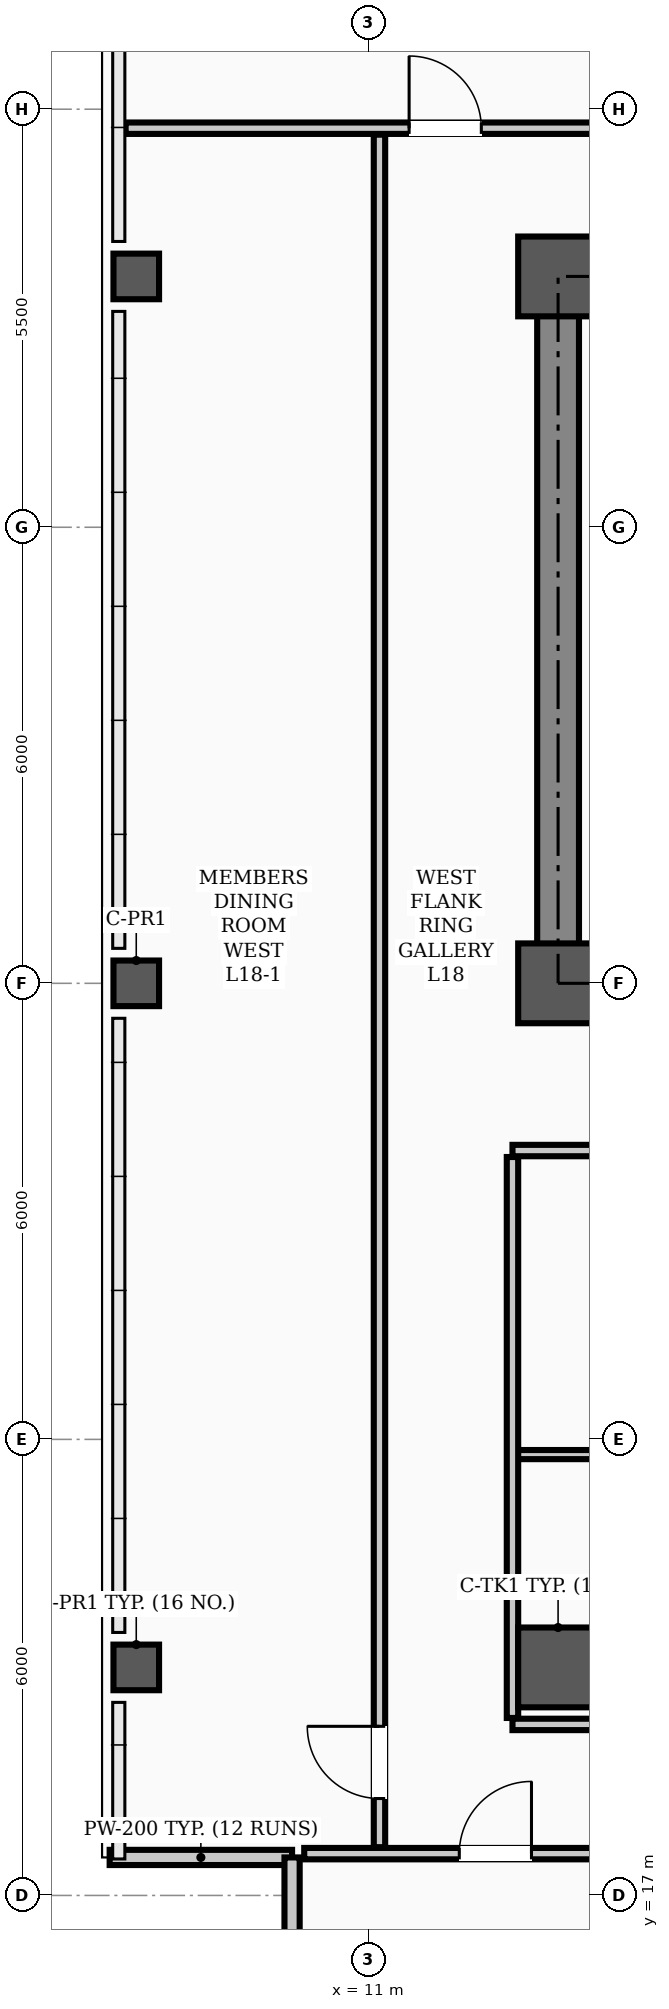
"""IFC4 building model, lengths in metres.
Left out: names, types, materials, properties, quantities, classifications, styles, units other than length and angle.
Written with IfcOpenShell. Run it as: python <this file> out.ifc"""

import sys

from ifc_helpers import new_model, si_unit, direction, frame, frame_2d, origin, origin_2d, place, context, subcontext, project, spatial, rectangle, hollow_rectangle, extrude, element, fill, save


model = new_model("IFC4")
c1 = context("Model", 3, precision=1e-05, world=origin(), true_north=direction((0.0, 1.0)))
c2 = subcontext(c1, "Body", "Model", "MODEL_VIEW")
j1 = project(units=[si_unit("LENGTHUNIT", "METRE"), si_unit("PLANEANGLEUNIT", "RADIAN")], contexts=[c1])
p1 = place(None, origin())
s1 = spatial("IfcSite", under=j1, at=p1, CompositionType="ELEMENT")
p2 = place(p1, origin())
s2 = spatial("IfcBuilding", under=s1, at=p2, CompositionType="ELEMENT")
p3 = place(p2, frame((0.0, 0.0, 73.3)))
s3 = spatial("IfcBuildingStorey", under=s2, at=p3, CompositionType="ELEMENT", Elevation=73.3)
for number, where, z_axis, x_axis in (
    (1, (13.5, 29.0, 0.0), (0.0, 0.0, 1.0), (1.0, 0.0, 0.0)),
    (2, (13.5, 38.3, 0.0), (0.0, 0.0, 1.0), (1.0, 0.0, 0.0)),
    (3, (13.5, 20.0, 0.0), (0.0, 0.0, 1.0), (1.0, 0.0, 0.0)),
):
    element("IfcColumn", number, at=place(p3, frame(where, z_axis=z_axis, x_axis=x_axis)), inside=s3, PredefinedType="COLUMN", context=c2, shape_type="SweptSolid", body=[
        extrude(hollow_rectangle(XDim=1.05, YDim=1.05, WallThickness=0.038, InnerFilletRadius=0.019, OuterFilletRadius=0.057, at=origin_2d()), origin(), (0.0, 0.0, 1.0), 3.9),
    ])
for number, where, z_axis, x_axis in (
    (4, (7.95, 20.0, 0.0), (0.0, 0.0, 1.0), (1.0, 0.0, 0.0)),
    (5, (7.95, 29.0, 0.0), (0.0, 0.0, 1.0), (1.0, 0.0, 0.0)),
    (6, (7.95, 38.3, 0.0), (0.0, 0.0, 1.0), (1.0, 0.0, 0.0)),
):
    element("IfcColumn", number, at=place(p3, frame(where, z_axis=z_axis, x_axis=x_axis)), inside=s3, PredefinedType="COLUMN", context=c2, shape_type="SweptSolid", body=[
        extrude(hollow_rectangle(XDim=0.6, YDim=0.6, WallThickness=0.026, InnerFilletRadius=0.013, OuterFilletRadius=0.039, at=origin_2d()), origin(), (0.0, 0.0, 1.0), 3.9),
    ])
for number, where, z_axis, x_axis in (
    (7, (7.6, 17.5, 0.0), (0.0, 0.0, 1.0), (1.0, 0.0, 0.0)),
    (8, (10.0, 17.5, 0.0), (0.0, 0.0, 1.0), (0.0, -1.0, 0.0)),
):
    element("IfcWall", number, at=place(p3, frame(where, z_axis=z_axis, x_axis=x_axis)), inside=s3, PredefinedType="PARAPET", context=c2, shape_type="SweptSolid", body=[
        extrude(rectangle(XDim=2.4, YDim=0.2, at=frame_2d((1.2, 0.0))), origin(), (0.0, 0.0, 1.0), 1.2),
    ])
p4 = place(p3, frame((13.5, 29.0, 0.0), z_axis=(0.0, 0.0, 1.0), x_axis=(1.0, 0.0, 0.0)))
e9 = element("IfcWall", 9, at=p4, inside=s3, PredefinedType="SHEAR", context=c2, shape_type="SweptSolid", body=[
    extrude(rectangle(XDim=30.5, YDim=0.55, at=frame_2d((15.25, 0.0))), origin(), (0.0, 0.0, 1.0), 3.72),
])
p5 = place(p4, frame((1.75, 0.0, 0.0)))
e10 = element("IfcOpeningElement", 10, at=p5, cuts=e9, PredefinedType="OPENING", context=c2, shape_type="SweptSolid", body=[
    extrude(rectangle(XDim=1.1, YDim=2.08, at=frame_2d((0.55, 1.04))), frame((0.0, 0.285, 0.0), z_axis=(0.0, -1.0, 0.0), x_axis=(1.0, 0.0, 0.0)), (0.0, 0.0, 1.0), 0.57),
])
p6 = place(p4, frame((26.7, 0.0, 0.0)))
e11 = element("IfcOpeningElement", 11, at=p6, cuts=e9, PredefinedType="OPENING", context=c2, shape_type="SweptSolid", body=[
    extrude(rectangle(XDim=1.1, YDim=2.08, at=frame_2d((0.55, 1.04))), frame((0.0, 0.285, 0.0), z_axis=(0.0, -1.0, 0.0), x_axis=(1.0, 0.0, 0.0)), (0.0, 0.0, 1.0), 0.57),
])
p7 = place(p4, frame((6.8, 0.0, 0.0)))
e12 = element("IfcOpeningElement", 12, at=p7, cuts=e9, PredefinedType="OPENING", context=c2, shape_type="SweptSolid", body=[
    extrude(rectangle(XDim=1.1, YDim=2.08, at=frame_2d((0.55, 1.04))), frame((0.0, 0.285, 0.0), z_axis=(0.0, -1.0, 0.0), x_axis=(1.0, 0.0, 0.0)), (0.0, 0.0, 1.0), 0.57),
])
p8 = place(p4, frame((13.2, 0.0, 0.0)))
e13 = element("IfcOpeningElement", 13, at=p8, cuts=e9, PredefinedType="OPENING", context=c2, shape_type="SweptSolid", body=[
    extrude(rectangle(XDim=1.6, YDim=2.08, at=frame_2d((0.8, 1.04))), frame((0.0, 0.285, 0.0), z_axis=(0.0, -1.0, 0.0), x_axis=(1.0, 0.0, 0.0)), (0.0, 0.0, 1.0), 0.57),
])
p9 = place(p4, frame((20.525, 0.0, 0.0)))
e14 = element("IfcOpeningElement", 14, at=p9, cuts=e9, PredefinedType="OPENING", context=c2, shape_type="SweptSolid", body=[
    extrude(rectangle(XDim=0.95, YDim=2.08, at=frame_2d((0.475, 1.04))), frame((0.0, 0.285, 0.0), z_axis=(0.0, -1.0, 0.0), x_axis=(1.0, 0.0, 0.0)), (0.0, 0.0, 1.0), 0.57),
])
p10 = place(p3, frame((13.5, 38.3, 0.0), z_axis=(0.0, 0.0, 1.0), x_axis=(1.0, 0.0, 0.0)))
e15 = element("IfcWall", 15, at=p10, inside=s3, PredefinedType="SHEAR", context=c2, shape_type="SweptSolid", body=[
    extrude(rectangle(XDim=30.5, YDim=0.55, at=frame_2d((15.25, 0.0))), origin(), (0.0, 0.0, 1.0), 3.72),
])
p11 = place(p3, frame((13.5, 29.35, 0.0), z_axis=(0.0, 0.0, 1.0), x_axis=(0.0, 1.0, 0.0)))
e16 = element("IfcWall", 16, at=p11, inside=s3, PredefinedType="SHEAR", context=c2, shape_type="SweptSolid", body=[
    extrude(rectangle(XDim=8.6, YDim=0.55, at=frame_2d((4.3, 0.0))), origin(), (0.0, 0.0, 1.0), 3.72),
])
p12 = place(p3, frame((12.9, 26.8, 0.0), z_axis=(0.0, 0.0, 1.0), x_axis=(1.0, 0.0, 0.0)))
e17 = element("IfcWall", 17, at=p12, inside=s3, PredefinedType="PARTITIONING", context=c2, shape_type="SweptSolid", body=[
    extrude(rectangle(XDim=31.7, YDim=0.15, at=frame_2d((15.85, 0.0))), origin(), (0.0, 0.0, 1.0), 3.1),
])
p13 = place(p12, frame((13.6, 0.0, 0.0)))
e18 = element("IfcOpeningElement", 18, at=p13, cuts=e17, PredefinedType="OPENING", context=c2, shape_type="SweptSolid", body=[
    extrude(rectangle(XDim=1.6, YDim=2.08, at=frame_2d((0.8, 1.04))), frame((0.0, 0.085, 0.0), z_axis=(0.0, -1.0, 0.0), x_axis=(1.0, 0.0, 0.0)), (0.0, 0.0, 1.0), 0.17),
])
p14 = place(p12, frame((2.475, 0.0, 0.0)))
e19 = element("IfcOpeningElement", 19, at=p14, cuts=e17, PredefinedType="OPENING", context=c2, shape_type="SweptSolid", body=[
    extrude(rectangle(XDim=0.95, YDim=2.08, at=frame_2d((0.475, 1.04))), frame((0.0, 0.085, 0.0), z_axis=(0.0, -1.0, 0.0), x_axis=(1.0, 0.0, 0.0)), (0.0, 0.0, 1.0), 0.17),
])
p15 = place(p12, frame((9.125, 0.0, 0.0)))
e20 = element("IfcOpeningElement", 20, at=p15, cuts=e17, PredefinedType="OPENING", context=c2, shape_type="SweptSolid", body=[
    extrude(rectangle(XDim=0.95, YDim=2.08, at=frame_2d((0.475, 1.04))), frame((0.0, 0.085, 0.0), z_axis=(0.0, -1.0, 0.0), x_axis=(1.0, 0.0, 0.0)), (0.0, 0.0, 1.0), 0.17),
])
p16 = place(p12, frame((19.125, 0.0, 0.0)))
e21 = element("IfcOpeningElement", 21, at=p16, cuts=e17, PredefinedType="OPENING", context=c2, shape_type="SweptSolid", body=[
    extrude(rectangle(XDim=0.95, YDim=2.08, at=frame_2d((0.475, 1.04))), frame((0.0, 0.085, 0.0), z_axis=(0.0, -1.0, 0.0), x_axis=(1.0, 0.0, 0.0)), (0.0, 0.0, 1.0), 0.17),
])
p17 = place(p12, frame((26.325, 0.0, 0.0)))
e22 = element("IfcOpeningElement", 22, at=p17, cuts=e17, PredefinedType="OPENING", context=c2, shape_type="SweptSolid", body=[
    extrude(rectangle(XDim=0.95, YDim=2.08, at=frame_2d((0.475, 1.04))), frame((0.0, 0.085, 0.0), z_axis=(0.0, -1.0, 0.0), x_axis=(1.0, 0.0, 0.0)), (0.0, 0.0, 1.0), 0.17),
])
p18 = place(p3, frame((10.16, 17.55, 0.0), z_axis=(0.0, 0.0, 1.0), x_axis=(1.0, 0.0, 0.0)))
e23 = element("IfcWall", 23, at=p18, inside=s3, PredefinedType="PARTITIONING", context=c2, shape_type="SweptSolid", body=[
    extrude(rectangle(XDim=44.68, YDim=0.15, at=frame_2d((22.34, 0.0))), origin(), (0.0, 0.0, 1.0), 3.1),
])
p19 = place(p18, frame((2.04, 0.0, 0.0)))
e24 = element("IfcOpeningElement", 24, at=p19, cuts=e23, PredefinedType="OPENING", context=c2, shape_type="SweptSolid", body=[
    extrude(rectangle(XDim=0.95, YDim=2.08, at=frame_2d((0.475, 1.04))), frame((0.0, 0.085, 0.0), z_axis=(0.0, -1.0, 0.0), x_axis=(1.0, 0.0, 0.0)), (0.0, 0.0, 1.0), 0.17),
])
p20 = place(p18, frame((6.565, 0.0, 0.0)))
e25 = element("IfcOpeningElement", 25, at=p20, cuts=e23, PredefinedType="OPENING", context=c2, shape_type="SweptSolid", body=[
    extrude(rectangle(XDim=0.95, YDim=2.08, at=frame_2d((0.475, 1.04))), frame((0.0, 0.085, 0.0), z_axis=(0.0, -1.0, 0.0), x_axis=(1.0, 0.0, 0.0)), (0.0, 0.0, 1.0), 0.17),
])
p21 = place(p18, frame((11.865, 0.0, 0.0)))
e26 = element("IfcOpeningElement", 26, at=p21, cuts=e23, PredefinedType="OPENING", context=c2, shape_type="SweptSolid", body=[
    extrude(rectangle(XDim=0.95, YDim=2.08, at=frame_2d((0.475, 1.04))), frame((0.0, 0.085, 0.0), z_axis=(0.0, -1.0, 0.0), x_axis=(1.0, 0.0, 0.0)), (0.0, 0.0, 1.0), 0.17),
])
p22 = place(p18, frame((24.665, 0.0, 0.0)))
e27 = element("IfcOpeningElement", 27, at=p22, cuts=e23, PredefinedType="OPENING", context=c2, shape_type="SweptSolid", body=[
    extrude(rectangle(XDim=0.95, YDim=2.08, at=frame_2d((0.475, 1.04))), frame((0.0, 0.085, 0.0), z_axis=(0.0, -1.0, 0.0), x_axis=(1.0, 0.0, 0.0)), (0.0, 0.0, 1.0), 0.17),
])
p23 = place(p18, frame((31.765, 0.0, 0.0)))
e28 = element("IfcOpeningElement", 28, at=p23, cuts=e23, PredefinedType="OPENING", context=c2, shape_type="SweptSolid", body=[
    extrude(rectangle(XDim=0.95, YDim=2.08, at=frame_2d((0.475, 1.04))), frame((0.0, 0.085, 0.0), z_axis=(0.0, -1.0, 0.0), x_axis=(1.0, 0.0, 0.0)), (0.0, 0.0, 1.0), 0.17),
])
p24 = place(p3, frame((12.9, 19.25, 0.0), z_axis=(0.0, 0.0, 1.0), x_axis=(1.0, 0.0, 0.0)))
e29 = element("IfcWall", 29, at=p24, inside=s3, PredefinedType="PARTITIONING", context=c2, shape_type="SweptSolid", body=[
    extrude(rectangle(XDim=13.3, YDim=0.15, at=frame_2d((6.65, 0.0))), origin(), (0.0, 0.0, 1.0), 3.1),
])
p25 = place(p24, frame((2.475, 0.0, 0.0)))
e30 = element("IfcOpeningElement", 30, at=p25, cuts=e29, PredefinedType="OPENING", context=c2, shape_type="SweptSolid", body=[
    extrude(rectangle(XDim=0.95, YDim=2.08, at=frame_2d((0.475, 1.04))), frame((0.0, 0.085, 0.0), z_axis=(0.0, -1.0, 0.0), x_axis=(1.0, 0.0, 0.0)), (0.0, 0.0, 1.0), 0.17),
])
p26 = place(p24, frame((9.125, 0.0, 0.0)))
e31 = element("IfcOpeningElement", 31, at=p26, cuts=e29, PredefinedType="OPENING", context=c2, shape_type="SweptSolid", body=[
    extrude(rectangle(XDim=0.95, YDim=2.08, at=frame_2d((0.475, 1.04))), frame((0.0, 0.085, 0.0), z_axis=(0.0, -1.0, 0.0), x_axis=(1.0, 0.0, 0.0)), (0.0, 0.0, 1.0), 0.17),
])
p27 = place(p3, frame((12.9, 22.8, 0.0), z_axis=(0.0, 0.0, 1.0), x_axis=(1.0, 0.0, 0.0)))
e32 = element("IfcWall", 32, at=p27, inside=s3, PredefinedType="PARTITIONING", context=c2, shape_type="SweptSolid", body=[
    extrude(rectangle(XDim=5.9, YDim=0.12, at=frame_2d((2.95, 0.0))), origin(), (0.0, 0.0, 1.0), 3.1),
])
p28 = place(p3, frame((7.81, 40.25, 0.0), z_axis=(0.0, 0.0, 1.0), x_axis=(1.0, 0.0, 0.0)))
e33 = element("IfcWall", 33, at=p28, inside=s3, PredefinedType="PARTITIONING", context=c2, shape_type="SweptSolid", body=[
    extrude(rectangle(XDim=49.38, YDim=0.15, at=frame_2d((24.69, 0.0))), origin(), (0.0, 0.0, 1.0), 3.1),
])
p29 = place(p28, frame((3.73, 0.0, 0.0)))
e34 = element("IfcOpeningElement", 34, at=p29, cuts=e33, PredefinedType="OPENING", context=c2, shape_type="SweptSolid", body=[
    extrude(rectangle(XDim=0.95, YDim=2.08, at=frame_2d((0.475, 1.04))), frame((0.0, 0.085, 0.0), z_axis=(0.0, -1.0, 0.0), x_axis=(1.0, 0.0, 0.0)), (0.0, 0.0, 1.0), 0.17),
])
p30 = place(p28, frame((11.015, 0.0, 0.0)))
e35 = element("IfcOpeningElement", 35, at=p30, cuts=e33, PredefinedType="OPENING", context=c2, shape_type="SweptSolid", body=[
    extrude(rectangle(XDim=0.95, YDim=2.08, at=frame_2d((0.475, 1.04))), frame((0.0, 0.085, 0.0), z_axis=(0.0, -1.0, 0.0), x_axis=(1.0, 0.0, 0.0)), (0.0, 0.0, 1.0), 0.17),
])
p31 = place(p28, frame((18.215, 0.0, 0.0)))
e36 = element("IfcOpeningElement", 36, at=p31, cuts=e33, PredefinedType="OPENING", context=c2, shape_type="SweptSolid", body=[
    extrude(rectangle(XDim=0.95, YDim=2.08, at=frame_2d((0.475, 1.04))), frame((0.0, 0.085, 0.0), z_axis=(0.0, -1.0, 0.0), x_axis=(1.0, 0.0, 0.0)), (0.0, 0.0, 1.0), 0.17),
])
p32 = place(p28, frame((25.515, 0.0, 0.0)))
e37 = element("IfcOpeningElement", 37, at=p32, cuts=e33, PredefinedType="OPENING", context=c2, shape_type="SweptSolid", body=[
    extrude(rectangle(XDim=0.95, YDim=2.08, at=frame_2d((0.475, 1.04))), frame((0.0, 0.085, 0.0), z_axis=(0.0, -1.0, 0.0), x_axis=(1.0, 0.0, 0.0)), (0.0, 0.0, 1.0), 0.17),
])
p33 = place(p28, frame((31.915, 0.0, 0.0)))
e38 = element("IfcOpeningElement", 38, at=p33, cuts=e33, PredefinedType="OPENING", context=c2, shape_type="SweptSolid", body=[
    extrude(rectangle(XDim=0.95, YDim=2.08, at=frame_2d((0.475, 1.04))), frame((0.0, 0.085, 0.0), z_axis=(0.0, -1.0, 0.0), x_axis=(1.0, 0.0, 0.0)), (0.0, 0.0, 1.0), 0.17),
])
p34 = place(p28, frame((37.2, 0.0, 0.0)))
e39 = element("IfcOpeningElement", 39, at=p34, cuts=e33, PredefinedType="OPENING", context=c2, shape_type="SweptSolid", body=[
    extrude(rectangle(XDim=0.95, YDim=2.08, at=frame_2d((0.475, 1.04))), frame((0.0, 0.085, 0.0), z_axis=(0.0, -1.0, 0.0), x_axis=(1.0, 0.0, 0.0)), (0.0, 0.0, 1.0), 0.17),
])
p35 = place(p3, frame((11.15, 17.635, 0.0), z_axis=(0.0, 0.0, 1.0), x_axis=(0.0, 1.0, 0.0)))
e40 = element("IfcWall", 40, at=p35, inside=s3, PredefinedType="PARTITIONING", context=c2, shape_type="SweptSolid", body=[
    extrude(rectangle(XDim=22.53, YDim=0.15, at=frame_2d((11.265, 0.0))), origin(), (0.0, 0.0, 1.0), 3.0),
])
p36 = place(p35, frame((0.64, 0.0, 0.0)))
e41 = element("IfcOpeningElement", 41, at=p36, cuts=e40, PredefinedType="OPENING", context=c2, shape_type="SweptSolid", body=[
    extrude(rectangle(XDim=0.95, YDim=2.08, at=frame_2d((0.475, 1.04))), frame((0.0, 0.085, 0.0), z_axis=(0.0, -1.0, 0.0), x_axis=(1.0, 0.0, 0.0)), (0.0, 0.0, 1.0), 0.17),
])
p37 = place(p3, frame((12.9, 19.335, 0.0), z_axis=(0.0, 0.0, 1.0), x_axis=(0.0, 1.0, 0.0)))
e42 = element("IfcWall", 42, at=p37, inside=s3, PredefinedType="PARTITIONING", context=c2, shape_type="SweptSolid", body=[
    extrude(rectangle(XDim=7.38, YDim=0.15, at=frame_2d((3.69, 0.0))), origin(), (0.0, 0.0, 1.0), 3.0),
])
p38 = place(p19, origin())
e43 = element("IfcDoor", 43, at=p38, inside=s3, OperationType="SINGLE_SWING_RIGHT", PredefinedType="DOOR", context=c2, shape_type="SweptSolid", body=[
    extrude(rectangle(XDim=0.95, YDim=2.08, at=frame_2d((0.475, 1.04))), frame((0.0, 0.025, 0.0), z_axis=(0.0, -1.0, 0.0), x_axis=(1.0, 0.0, 0.0)), (0.0, 0.0, 1.0), 0.05),
])
fill(e24, e43)
p39 = place(p36, origin())
e44 = element("IfcDoor", 44, at=p39, inside=s3, OperationType="SINGLE_SWING_RIGHT", PredefinedType="DOOR", context=c2, shape_type="SweptSolid", body=[
    extrude(rectangle(XDim=0.95, YDim=2.08, at=frame_2d((0.475, 1.04))), frame((0.0, 0.025, 0.0), z_axis=(0.0, -1.0, 0.0), x_axis=(1.0, 0.0, 0.0)), (0.0, 0.0, 1.0), 0.05),
])
fill(e41, e44)
p40 = place(p29, origin())
e45 = element("IfcDoor", 45, at=p40, inside=s3, OperationType="SINGLE_SWING_LEFT", PredefinedType="DOOR", context=c2, shape_type="SweptSolid", body=[
    extrude(rectangle(XDim=0.95, YDim=2.08, at=frame_2d((0.475, 1.04))), frame((0.0, 0.025, 0.0), z_axis=(0.0, -1.0, 0.0), x_axis=(1.0, 0.0, 0.0)), (0.0, 0.0, 1.0), 0.05),
])
fill(e34, e45)
save(model, sys.argv[1])
